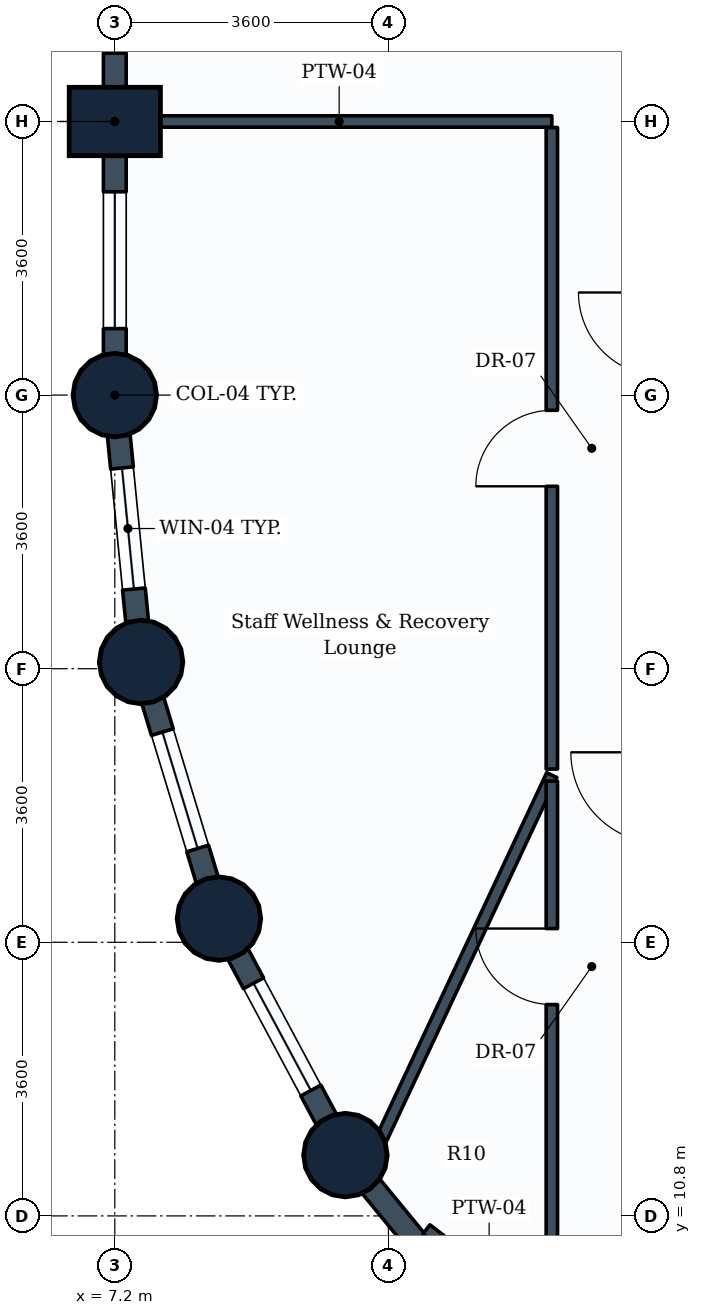
"""IFC4 building model, lengths in metres.
Left out: names, types, materials, properties, quantities, classifications, styles, units other than length and angle.
Written with IfcOpenShell. Run it as: python <this file> out.ifc"""

import sys

from ifc_helpers import new_model, si_unit, direction, frame, frame_2d, origin, origin_2d, place, context, subcontext, project, spatial, rectangle, circle, extrude, element, fill, save


model = new_model("IFC4")
c1 = context("Model", 3, precision=1e-05, world=origin(), true_north=direction((0.0, 1.0)))
c2 = subcontext(c1, "Body", "Model", "MODEL_VIEW")
j1 = project(units=[si_unit("LENGTHUNIT", "METRE"), si_unit("PLANEANGLEUNIT", "RADIAN")], contexts=[c1])
p1 = place(None, origin())
s1 = spatial("IfcSite", under=j1, at=p1, CompositionType="ELEMENT")
p2 = place(p1, origin())
s2 = spatial("IfcBuilding", under=s1, at=p2, CompositionType="ELEMENT")
p3 = place(p2, frame((0.0, 0.0, 55.2)))
s3 = spatial("IfcBuildingStorey", under=s2, at=p3, CompositionType="ELEMENT", Elevation=55.2)
p4 = place(p3, frame((7.2, 21.6, 0.0), z_axis=(0.0, 0.0, 1.0), x_axis=(1.0, 0.0, 0.0)))
e1 = element("IfcColumn", 1, at=p4, inside=s3, PredefinedType="COLUMN", context=c2, shape_type="SweptSolid", body=[
    extrude(circle(Radius=0.55, at=origin_2d()), origin(), (0.0, 0.0, 1.0), 3.9),
])
p5 = place(p3, frame((7.2, 25.2, 0.0), z_axis=(0.0, 0.0, 1.0), x_axis=(0.0, 1.0, 0.0)))
e2 = element("IfcColumn", 2, at=p5, inside=s3, PredefinedType="COLUMN", context=c2, shape_type="SweptSolid", body=[
    extrude(rectangle(XDim=0.9, YDim=1.2, at=origin_2d()), origin(), (0.0, 0.0, 1.0), 3.9),
])
for number, where, z_axis, x_axis in (
    (3, (7.546, 18.088, 0.0), (0.0, 0.0, 1.0), (1.0, 0.0, 0.0)),
    (4, (8.57, 14.712, 0.0), (0.0, 0.0, 1.0), (1.0, 0.0, 0.0)),
    (5, (10.234, 11.6, 0.0), (0.0, 0.0, 1.0), (1.0, 0.0, 0.0)),
):
    element("IfcColumn", number, at=place(p3, frame(where, z_axis=z_axis, x_axis=x_axis)), inside=s3, PredefinedType="COLUMN", context=c2, shape_type="SweptSolid", body=[
        extrude(circle(Radius=0.55, at=origin_2d()), origin(), (0.0, 0.0, 1.0), 3.9),
    ])
p6 = place(p3, frame((7.2, 25.2, 0.0), z_axis=(0.0, 0.0, 1.0), x_axis=(0.0, 1.0, 0.0)))
e6 = element("IfcWall", 6, at=p6, inside=s3, PredefinedType="STANDARD", context=c2, shape_type="SweptSolid", body=[
    extrude(rectangle(XDim=3.6, YDim=0.3, at=frame_2d((1.8, 0.0))), origin(), (0.0, 0.0, 1.0), 2.93),
])
p7 = place(p6, frame((0.9, 0.0, 0.85)))
e7 = element("IfcOpeningElement", 7, at=p7, cuts=e6, PredefinedType="OPENING", context=c2, shape_type="SweptSolid", body=[
    extrude(rectangle(XDim=1.8, YDim=1.35, at=frame_2d((0.9, 0.675))), frame((0.0, 0.16, 0.0), z_axis=(0.0, -1.0, 0.0), x_axis=(1.0, 0.0, 0.0)), (0.0, 0.0, 1.0), 0.32),
])
p8 = place(p3, frame((7.2, 21.6, 0.0), z_axis=(0.0, 0.0, 1.0), x_axis=(0.0, 1.0, 0.0)))
e8 = element("IfcWall", 8, at=p8, inside=s3, PredefinedType="STANDARD", context=c2, shape_type="SweptSolid", body=[
    extrude(rectangle(XDim=3.6, YDim=0.3, at=frame_2d((1.8, 0.0))), origin(), (0.0, 0.0, 1.0), 2.93),
])
p9 = place(p8, frame((0.875, 0.0, 0.85)))
e9 = element("IfcOpeningElement", 9, at=p9, cuts=e8, PredefinedType="OPENING", context=c2, shape_type="SweptSolid", body=[
    extrude(rectangle(XDim=1.8, YDim=1.35, at=frame_2d((0.9, 0.675))), frame((0.0, 0.16, 0.0), z_axis=(0.0, -1.0, 0.0), x_axis=(1.0, 0.0, 0.0)), (0.0, 0.0, 1.0), 0.32),
])
p10 = place(p3, frame((7.546, 18.088, 0.0), z_axis=(0.0, 0.0, 1.0), x_axis=(-0.09802417461, 0.995184033831, 0.0)))
e10 = element("IfcWall", 10, at=p10, inside=s3, PredefinedType="STANDARD", context=c2, shape_type="SweptSolid", body=[
    extrude(rectangle(XDim=3.529, YDim=0.3, at=frame_2d((1.765, 0.0))), origin(), (0.0, 0.0, 1.0), 2.93),
])
p11 = place(p10, frame((0.965, 0.0, 0.85)))
e11 = element("IfcOpeningElement", 11, at=p11, cuts=e10, PredefinedType="OPENING", context=c2, shape_type="SweptSolid", body=[
    extrude(rectangle(XDim=1.6, YDim=1.35, at=frame_2d((0.8, 0.675))), frame((0.0, 0.16, 0.0), z_axis=(0.0, -1.0, 0.0), x_axis=(1.0, 0.0, 0.0)), (0.0, 0.0, 1.0), 0.32),
])
p12 = place(p3, frame((8.57, 14.712, 0.0), z_axis=(0.0, 0.0, 1.0), x_axis=(-0.290305086481, 0.956934144423, 0.0)))
e12 = element("IfcWall", 12, at=p12, inside=s3, PredefinedType="STANDARD", context=c2, shape_type="SweptSolid", body=[
    extrude(rectangle(XDim=3.528, YDim=0.3, at=frame_2d((1.764, 0.0))), origin(), (0.0, 0.0, 1.0), 2.93),
])
p13 = place(p12, frame((0.964, 0.0, 0.85)))
e13 = element("IfcOpeningElement", 13, at=p13, cuts=e12, PredefinedType="OPENING", context=c2, shape_type="SweptSolid", body=[
    extrude(rectangle(XDim=1.6, YDim=1.35, at=frame_2d((0.8, 0.675))), frame((0.0, 0.16, 0.0), z_axis=(0.0, -1.0, 0.0), x_axis=(1.0, 0.0, 0.0)), (0.0, 0.0, 1.0), 0.32),
])
p14 = place(p3, frame((10.234, 11.6, 0.0), z_axis=(0.0, 0.0, 1.0), x_axis=(-0.47151087309, 0.881860247748, 0.0)))
e14 = element("IfcWall", 14, at=p14, inside=s3, PredefinedType="STANDARD", context=c2, shape_type="SweptSolid", body=[
    extrude(rectangle(XDim=3.529, YDim=0.3, at=frame_2d((1.764, 0.0))), origin(), (0.0, 0.0, 1.0), 2.93),
])
p15 = place(p14, frame((0.964, 0.0, 0.85)))
e15 = element("IfcOpeningElement", 15, at=p15, cuts=e14, PredefinedType="OPENING", context=c2, shape_type="SweptSolid", body=[
    extrude(rectangle(XDim=1.6, YDim=1.35, at=frame_2d((0.8, 0.675))), frame((0.0, 0.16, 0.0), z_axis=(0.0, -1.0, 0.0), x_axis=(1.0, 0.0, 0.0)), (0.0, 0.0, 1.0), 0.32),
])
p16 = place(p3, frame((12.472, 8.872, 0.0), z_axis=(0.0, 0.0, 1.0), x_axis=(-0.634258295121, 0.773121216285, 0.0)))
e16 = element("IfcWall", 16, at=p16, inside=s3, PredefinedType="STANDARD", context=c2, shape_type="SweptSolid", body=[
    extrude(rectangle(XDim=3.529, YDim=0.3, at=frame_2d((1.764, 0.0))), origin(), (0.0, 0.0, 1.0), 2.93),
])
p17 = place(p3, frame((7.354, 25.2, 0.0), z_axis=(0.0, 0.0, 1.0), x_axis=(1.0, 0.0, 0.0)))
e17 = element("IfcWall", 17, at=p17, inside=s3, PredefinedType="PARTITIONING", context=c2, shape_type="SweptSolid", body=[
    extrude(rectangle(XDim=5.596, YDim=0.15, at=frame_2d((2.798, 0.0))), origin(), (0.0, 0.0, 1.0), 3.635),
])
p18 = place(p3, frame((12.95, 9.35, 0.0), z_axis=(0.0, 0.0, 1.0), x_axis=(-0.791573423038, 0.611074067474, 0.0)))
e18 = element("IfcWall", 18, at=p18, inside=s3, PredefinedType="PARTITIONING", context=c2, shape_type="SweptSolid", body=[
    extrude(rectangle(XDim=2.084, YDim=0.15, at=frame_2d((1.042, 0.0))), origin(), (0.0, 0.0, 1.0), 2.93),
])
p19 = place(p3, frame((12.95, 16.6, 0.0), z_axis=(0.0, 0.0, 1.0), x_axis=(-0.424335060038, -0.905505249473, 0.0)))
e19 = element("IfcWall", 19, at=p19, inside=s3, PredefinedType="PARTITIONING", context=c2, shape_type="SweptSolid", body=[
    extrude(rectangle(XDim=5.76, YDim=0.15, at=frame_2d((2.88, 0.0))), origin(), (0.0, 0.0, 1.0), 2.93),
])
p20 = place(p3, frame((12.95, 16.679, 0.0), z_axis=(0.0, 0.0, 1.0), x_axis=(0.0, 1.0, 0.0)))
e20 = element("IfcWall", 20, at=p20, inside=s3, PredefinedType="PARTITIONING", context=c2, shape_type="SweptSolid", body=[
    extrude(rectangle(XDim=8.442, YDim=0.15, at=frame_2d((4.221, 0.0))), origin(), (0.0, 0.0, 1.0), 3.08),
])
p21 = place(p20, frame((3.721, 0.0, 0.0)))
e21 = element("IfcOpeningElement", 21, at=p21, cuts=e20, PredefinedType="OPENING", context=c2, shape_type="SweptSolid", body=[
    extrude(rectangle(XDim=1.0, YDim=2.1, at=frame_2d((0.5, 1.05))), frame((0.0, 0.085, 0.0), z_axis=(0.0, -1.0, 0.0), x_axis=(1.0, 0.0, 0.0)), (0.0, 0.0, 1.0), 0.17),
])
p22 = place(p3, frame((12.95, 8.634, 0.0), z_axis=(0.0, 0.0, 1.0), x_axis=(0.0, 1.0, 0.0)))
e22 = element("IfcWall", 22, at=p22, inside=s3, PredefinedType="PARTITIONING", context=c2, shape_type="SweptSolid", body=[
    extrude(rectangle(XDim=7.887, YDim=0.15, at=frame_2d((3.944, 0.0))), origin(), (0.0, 0.0, 1.0), 2.93),
])
p23 = place(p22, frame((4.947, 0.0, 0.0)))
e23 = element("IfcOpeningElement", 23, at=p23, cuts=e22, PredefinedType="OPENING", context=c2, shape_type="SweptSolid", body=[
    extrude(rectangle(XDim=1.0, YDim=2.1, at=frame_2d((0.5, 1.05))), frame((0.0, 0.085, 0.0), z_axis=(0.0, -1.0, 0.0), x_axis=(1.0, 0.0, 0.0)), (0.0, 0.0, 1.0), 0.17),
])
p24 = place(p7, origin())
e24 = element("IfcWindow", 24, at=p24, inside=s3, PartitioningType="SINGLE_PANEL", PredefinedType="WINDOW", context=c2, shape_type="SweptSolid", body=[
    extrude(rectangle(XDim=1.8, YDim=1.35, at=frame_2d((0.9, 0.675))), frame((0.0, 0.03, 0.0), z_axis=(0.0, -1.0, 0.0), x_axis=(1.0, 0.0, 0.0)), (0.0, 0.0, 1.0), 0.06),
])
fill(e7, e24)
p25 = place(p9, origin())
e25 = element("IfcWindow", 25, at=p25, inside=s3, PartitioningType="SINGLE_PANEL", PredefinedType="WINDOW", context=c2, shape_type="SweptSolid", body=[
    extrude(rectangle(XDim=1.8, YDim=1.35, at=frame_2d((0.9, 0.675))), frame((0.0, 0.03, 0.0), z_axis=(0.0, -1.0, 0.0), x_axis=(1.0, 0.0, 0.0)), (0.0, 0.0, 1.0), 0.06),
])
fill(e9, e25)
p26 = place(p11, origin())
e26 = element("IfcWindow", 26, at=p26, inside=s3, PartitioningType="SINGLE_PANEL", PredefinedType="WINDOW", context=c2, shape_type="SweptSolid", body=[
    extrude(rectangle(XDim=1.6, YDim=1.35, at=frame_2d((0.8, 0.675))), frame((0.0, 0.03, 0.0), z_axis=(0.0, -1.0, 0.0), x_axis=(1.0, 0.0, 0.0)), (0.0, 0.0, 1.0), 0.06),
])
fill(e11, e26)
p27 = place(p13, origin())
e27 = element("IfcWindow", 27, at=p27, inside=s3, PartitioningType="SINGLE_PANEL", PredefinedType="WINDOW", context=c2, shape_type="SweptSolid", body=[
    extrude(rectangle(XDim=1.6, YDim=1.35, at=frame_2d((0.8, 0.675))), frame((0.0, 0.03, 0.0), z_axis=(0.0, -1.0, 0.0), x_axis=(1.0, 0.0, 0.0)), (0.0, 0.0, 1.0), 0.06),
])
fill(e13, e27)
p28 = place(p15, origin())
e28 = element("IfcWindow", 28, at=p28, inside=s3, PartitioningType="SINGLE_PANEL", PredefinedType="WINDOW", context=c2, shape_type="SweptSolid", body=[
    extrude(rectangle(XDim=1.6, YDim=1.35, at=frame_2d((0.8, 0.675))), frame((0.0, 0.03, 0.0), z_axis=(0.0, -1.0, 0.0), x_axis=(1.0, 0.0, 0.0)), (0.0, 0.0, 1.0), 0.06),
])
fill(e15, e28)
p29 = place(p21, origin())
e29 = element("IfcDoor", 29, at=p29, inside=s3, OperationType="SINGLE_SWING_LEFT", PredefinedType="DOOR", context=c2, shape_type="SweptSolid", body=[
    extrude(rectangle(XDim=1.0, YDim=2.1, at=frame_2d((0.5, 1.05))), frame((0.0, 0.025, 0.0), z_axis=(0.0, -1.0, 0.0), x_axis=(1.0, 0.0, 0.0)), (0.0, 0.0, 1.0), 0.05),
])
fill(e21, e29)
p30 = place(p23, origin())
e30 = element("IfcDoor", 30, at=p30, inside=s3, OperationType="SINGLE_SWING_RIGHT", PredefinedType="DOOR", context=c2, shape_type="SweptSolid", body=[
    extrude(rectangle(XDim=1.0, YDim=2.1, at=frame_2d((0.5, 1.05))), frame((0.0, 0.025, 0.0), z_axis=(0.0, -1.0, 0.0), x_axis=(1.0, 0.0, 0.0)), (0.0, 0.0, 1.0), 0.05),
])
fill(e23, e30)
save(model, sys.argv[1])
